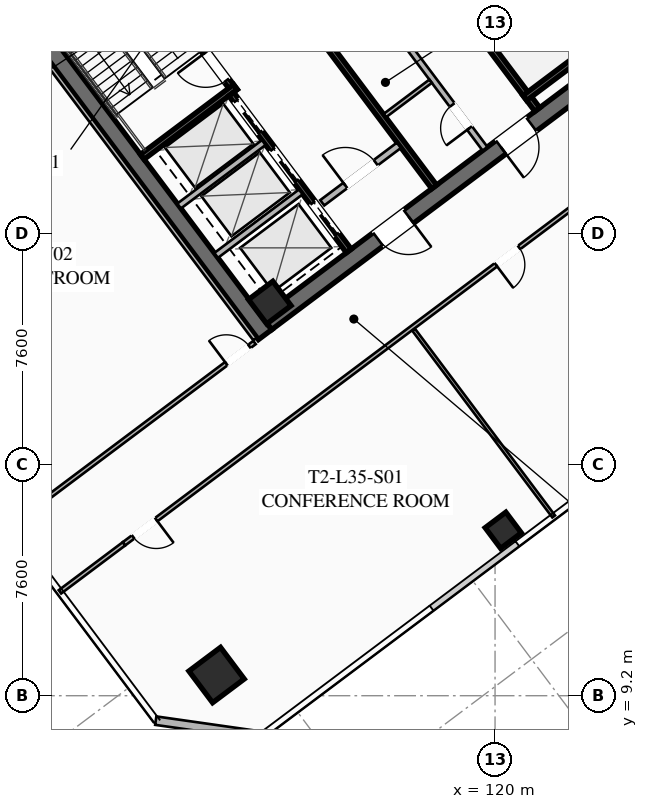
"""IFC4 building model, lengths in metres.
Left out: names, types, materials, properties, quantities, classifications, styles, units other than length and angle.
Written with IfcOpenShell. Run it as: python <this file> out.ifc"""

import sys

from ifc_helpers import new_model, si_unit, direction, frame, frame_2d, origin, origin_2d, place, context, subcontext, project, spatial, rectangle, hollow_rectangle, extrude, element, fill, save


model = new_model("IFC4")
c1 = context("Model", 3, precision=1e-05, world=origin(), true_north=direction((0.0, 1.0)))
c2 = subcontext(c1, "Body", "Model", "MODEL_VIEW")
j1 = project(units=[si_unit("LENGTHUNIT", "METRE"), si_unit("PLANEANGLEUNIT", "RADIAN")], contexts=[c1])
p1 = place(None, origin())
s1 = spatial("IfcSite", under=j1, at=p1, CompositionType="ELEMENT")
p2 = place(p1, origin())
s2 = spatial("IfcBuilding", under=s1, at=p2, CompositionType="ELEMENT")
p3 = place(p2, frame((0.0, 0.0, 132.15)))
s3 = spatial("IfcBuildingStorey", under=s2, at=p3, CompositionType="ELEMENT", Elevation=132.15)
for number, where, z_axis, x_axis in (
    (1, (112.436, 21.077, 0.0), (0.0, 0.0, 1.0), (-0.6, 0.8, 0.0)),
    (2, (115.564, 42.923, 0.0), (0.0, 0.0, 1.0), (0.6, -0.8, 0.0)),
):
    element("IfcWall", number, at=place(p3, frame(where, z_axis=z_axis, x_axis=x_axis)), inside=s3, PredefinedType="SHEAR", context=c2, shape_type="SweptSolid", body=[
        extrude(rectangle(XDim=15.6, YDim=0.55, at=frame_2d((7.8, 0.0))), origin(), (0.0, 0.0, 1.0), 3.55),
    ])
p4 = place(p3, frame((124.539, 30.498, 0.0), z_axis=(0.0, 0.0, 1.0), x_axis=(-0.799998054672, -0.600002593761, 0.0)))
e3 = element("IfcWall", 3, at=p4, inside=s3, PredefinedType="SHEAR", context=c2, shape_type="SweptSolid", body=[
    extrude(rectangle(XDim=15.06, YDim=0.55, at=frame_2d((7.53, 0.0))), origin(), (0.0, 0.0, 1.0), 3.55),
])
p5 = place(p4, frame((9.23, 0.0, 0.0)))
e4 = element("IfcOpeningElement", 4, at=p5, cuts=e3, PredefinedType="OPENING", context=c2, shape_type="SweptSolid", body=[
    extrude(rectangle(XDim=1.25, YDim=2.25, at=frame_2d((0.625, 1.125))), frame((0.0, 0.285, 0.0), z_axis=(0.0, -1.0, 0.0), x_axis=(1.0, 0.0, 0.0)), (0.0, 0.0, 1.0), 0.57),
])
p6 = place(p4, frame((4.18, 0.0, 0.0)))
e5 = element("IfcOpeningElement", 5, at=p6, cuts=e3, PredefinedType="OPENING", context=c2, shape_type="SweptSolid", body=[
    extrude(rectangle(XDim=1.25, YDim=2.25, at=frame_2d((0.625, 1.125))), frame((0.0, 0.285, 0.0), z_axis=(0.0, -1.0, 0.0), x_axis=(1.0, 0.0, 0.0)), (0.0, 0.0, 1.0), 0.57),
])
p7 = place(p3, frame((112.59, 22.13, 0.0), z_axis=(0.0, 0.0, 1.0), x_axis=(0.799999996291, 0.600000004945, 0.0)))
e6 = element("IfcColumn", 6, at=p7, inside=s3, PredefinedType="COLUMN", context=c2, shape_type="SweptSolid", body=[
    extrude(hollow_rectangle(XDim=1.0, YDim=1.0, WallThickness=0.04, at=origin_2d()), origin(), (0.0, 0.0, 1.0), 3.37),
])
p8 = place(p3, frame((110.84, 9.88, 0.0), z_axis=(0.0, 0.0, 1.0), x_axis=(0.799999996291, 0.600000004945, 0.0)))
e7 = element("IfcColumn", 7, at=p8, inside=s3, PredefinedType="COLUMN", context=c2, shape_type="SweptSolid", body=[
    extrude(hollow_rectangle(XDim=1.3, YDim=1.3, WallThickness=0.05, at=origin_2d()), origin(), (0.0, 0.0, 1.0), 3.37),
])
p9 = place(p3, frame((120.27, 14.64, 0.0), z_axis=(0.0, 0.0, 1.0), x_axis=(0.799999996291, 0.600000004945, 0.0)))
e8 = element("IfcColumn", 8, at=p9, inside=s3, PredefinedType="COLUMN", context=c2, shape_type="SweptSolid", body=[
    extrude(hollow_rectangle(XDim=0.85, YDim=0.85, WallThickness=0.035, at=origin_2d()), origin(), (0.0, 0.0, 1.0), 3.37),
])
p10 = place(p3, frame((112.34, 7.88, 0.0), z_axis=(0.0, 0.0, 1.0), x_axis=(-0.989949493661, 0.141421356237, 0.0)))
e9 = element("IfcWall", 9, at=p10, inside=s3, PredefinedType="SOLIDWALL", context=c2, shape_type="SweptSolid", body=[
    extrude(rectangle(XDim=3.536, YDim=0.28, at=frame_2d((1.768, 0.0))), origin(), (0.0, 0.0, 1.0), 3.37),
])
p11 = place(p3, frame((111.44, 29.08, 0.0), z_axis=(0.0, 0.0, 1.0), x_axis=(-0.59999029481, 0.8000072788, 0.0)))
e10 = element("IfcWall", 10, at=p11, inside=s3, PredefinedType="SHEAR", context=c2, shape_type="SweptSolid", body=[
    extrude(rectangle(XDim=8.05, YDim=0.2, at=frame_2d((4.025, 0.0))), origin(), (0.0, 0.0, 1.0), 3.37),
])
p12 = place(p11, frame((0.45, 0.0, 0.0)))
e11 = element("IfcOpeningElement", 11, at=p12, cuts=e10, PredefinedType="OPENING", context=c2, shape_type="SweptSolid", body=[
    extrude(rectangle(XDim=1.15, YDim=2.2, at=frame_2d((0.575, 1.1))), frame((0.0, 0.11, 0.0), z_axis=(0.0, -1.0, 0.0), x_axis=(1.0, 0.0, 0.0)), (0.0, 0.0, 1.0), 0.22),
])
p13 = place(p3, frame((108.396, 26.922, 0.0), z_axis=(0.0, 0.0, 1.0), x_axis=(0.800015298837, 0.599979601008, 0.0)))
e12 = element("IfcWall", 12, at=p13, inside=s3, PredefinedType="SHEAR", context=c2, shape_type="SweptSolid", body=[
    extrude(rectangle(XDim=3.83, YDim=0.2, at=frame_2d((1.915, 0.0))), origin(), (0.0, 0.0, 1.0), 3.37),
])
p14 = place(p3, frame((116.56, 34.92, 0.0), z_axis=(0.0, 0.0, 1.0), x_axis=(0.59999029481, -0.8000072788, 0.0)))
e13 = element("IfcWall", 13, at=p14, inside=s3, PredefinedType="SHEAR", context=c2, shape_type="SweptSolid", body=[
    extrude(rectangle(XDim=8.05, YDim=0.2, at=frame_2d((4.025, 0.0))), origin(), (0.0, 0.0, 1.0), 3.37),
])
p15 = place(p14, frame((0.45, 0.0, 0.0)))
e14 = element("IfcOpeningElement", 14, at=p15, cuts=e13, PredefinedType="OPENING", context=c2, shape_type="SweptSolid", body=[
    extrude(rectangle(XDim=1.15, YDim=2.2, at=frame_2d((0.575, 1.1))), frame((0.0, 0.11, 0.0), z_axis=(0.0, -1.0, 0.0), x_axis=(1.0, 0.0, 0.0)), (0.0, 0.0, 1.0), 0.22),
])
p16 = place(p3, frame((120.98, 28.86, 0.0), z_axis=(0.0, 0.0, 1.0), x_axis=(0.800015298837, 0.599979601008, 0.0)))
e15 = element("IfcWall", 15, at=p16, inside=s3, PredefinedType="SHEAR", context=c2, shape_type="SweptSolid", body=[
    extrude(rectangle(XDim=3.83, YDim=0.2, at=frame_2d((1.915, 0.0))), origin(), (0.0, 0.0, 1.0), 3.37),
])
p17 = place(p3, frame((117.998, 25.936, 0.0), z_axis=(0.0, 0.0, 1.0), x_axis=(-0.600002693989, 0.799997979501, 0.0)))
e16 = element("IfcWall", 16, at=p17, inside=s3, PredefinedType="SHEAR", context=c2, shape_type="SweptSolid", body=[
    extrude(rectangle(XDim=14.5, YDim=0.2, at=frame_2d((7.25, 0.0))), origin(), (0.0, 0.0, 1.0), 3.37),
])
p18 = place(p3, frame((114.316, 25.412, 0.0), z_axis=(0.0, 0.0, 1.0), x_axis=(0.800018601094, 0.59997519774, 0.0)))
e17 = element("IfcWall", 17, at=p18, inside=s3, PredefinedType="SOLIDWALL", context=c2, shape_type="SweptSolid", body=[
    extrude(rectangle(XDim=3.15, YDim=0.22, at=frame_2d((1.575, 0.0))), origin(), (0.0, 0.0, 1.0), 2.723),
])
p19 = place(p18, frame((0.95, 0.0, 0.0)))
e18 = element("IfcOpeningElement", 18, at=p19, cuts=e17, PredefinedType="OPENING", context=c2, shape_type="SweptSolid", body=[
    extrude(rectangle(XDim=1.25, YDim=2.25, at=frame_2d((0.625, 1.125))), frame((0.0, 0.12, 0.0), z_axis=(0.0, -1.0, 0.0), x_axis=(1.0, 0.0, 0.0)), (0.0, 0.0, 1.0), 0.24),
])
p20 = place(p3, frame((115.19, 23.83, 0.0), z_axis=(0.0, 0.0, 1.0), x_axis=(-0.599993943644, 0.800004542231, 0.0)))
e19 = element("IfcWall", 19, at=p20, inside=s3, PredefinedType="SHEAR", context=c2, shape_type="SweptSolid", body=[
    extrude(rectangle(XDim=6.45, YDim=0.2, at=frame_2d((3.225, 0.0))), origin(), (0.0, 0.0, 1.0), 3.37),
])
p21 = place(p20, frame((4.875, 0.0, 0.0)))
e20 = element("IfcOpeningElement", 20, at=p21, cuts=e19, PredefinedType="OPENING", context=c2, shape_type="SweptSolid", body=[
    extrude(rectangle(XDim=1.3, YDim=2.25, at=frame_2d((0.65, 1.125))), frame((0.0, 0.11, 0.0), z_axis=(0.0, -1.0, 0.0), x_axis=(1.0, 0.0, 0.0)), (0.0, 0.0, 1.0), 0.22),
])
p22 = place(p20, frame((2.875, 0.0, 0.0)))
e21 = element("IfcOpeningElement", 21, at=p22, cuts=e19, PredefinedType="OPENING", context=c2, shape_type="SweptSolid", body=[
    extrude(rectangle(XDim=1.3, YDim=2.25, at=frame_2d((0.65, 1.125))), frame((0.0, 0.11, 0.0), z_axis=(0.0, -1.0, 0.0), x_axis=(1.0, 0.0, 0.0)), (0.0, 0.0, 1.0), 0.22),
])
p23 = place(p20, frame((0.675, 0.0, 0.0)))
e22 = element("IfcOpeningElement", 22, at=p23, cuts=e19, PredefinedType="OPENING", context=c2, shape_type="SweptSolid", body=[
    extrude(rectangle(XDim=1.3, YDim=2.25, at=frame_2d((0.65, 1.125))), frame((0.0, 0.11, 0.0), z_axis=(0.0, -1.0, 0.0), x_axis=(1.0, 0.0, 0.0)), (0.0, 0.0, 1.0), 0.22),
])
for number, where, z_axis, x_axis in (
    (23, (110.826, 23.682, 0.0), (0.0, 0.0, 1.0), (0.8, 0.6, 0.0)),
    (24, (109.608, 25.306, 0.0), (0.0, 0.0, 1.0), (0.8, 0.6, 0.0)),
):
    element("IfcWall", number, at=place(p3, frame(where, z_axis=z_axis, x_axis=x_axis)), inside=s3, PredefinedType="SOLIDWALL", context=c2, shape_type="SweptSolid", body=[
        extrude(rectangle(XDim=3.48, YDim=0.2, at=frame_2d((1.74, 0.0))), origin(), (0.0, 0.0, 1.0), 3.37),
    ])
p24 = place(p3, frame((119.67, 27.19, 0.0), z_axis=(0.0, 0.0, 1.0), x_axis=(-0.599988677396, 0.800008491828, 0.0)))
e25 = element("IfcWall", 25, at=p24, inside=s3, PredefinedType="SOLIDWALL", context=c2, shape_type="SweptSolid", body=[
    extrude(rectangle(XDim=6.9, YDim=0.2, at=frame_2d((3.45, 0.0))), origin(), (0.0, 0.0, 1.0), 2.723),
])
p25 = place(p24, frame((0.85, 0.0, 0.0)))
e26 = element("IfcOpeningElement", 26, at=p25, cuts=e25, PredefinedType="OPENING", context=c2, shape_type="SweptSolid", body=[
    extrude(rectangle(XDim=0.95, YDim=2.05, at=frame_2d((0.475, 1.025))), frame((0.0, 0.11, 0.0), z_axis=(0.0, -1.0, 0.0), x_axis=(1.0, 0.0, 0.0)), (0.0, 0.0, 1.0), 0.22),
])
p26 = place(p24, frame((4.8, 0.0, 0.0)))
e27 = element("IfcOpeningElement", 27, at=p26, cuts=e25, PredefinedType="OPENING", context=c2, shape_type="SweptSolid", body=[
    extrude(rectangle(XDim=1.05, YDim=2.2, at=frame_2d((0.525, 1.1))), frame((0.0, 0.11, 0.0), z_axis=(0.0, -1.0, 0.0), x_axis=(1.0, 0.0, 0.0)), (0.0, 0.0, 1.0), 0.22),
])
p27 = place(p3, frame((116.376, 28.282, 0.0), z_axis=(0.0, 0.0, 1.0), x_axis=(0.8, 0.6, 0.0)))
e28 = element("IfcWall", 28, at=p27, inside=s3, PredefinedType="PARTITIONING", context=c2, shape_type="SweptSolid", body=[
    extrude(rectangle(XDim=1.88, YDim=0.135, at=frame_2d((0.94, 0.0))), origin(), (0.0, 0.0, 1.0), 2.723),
])
p28 = place(p3, frame((95.87, 30.09, 0.0), z_axis=(0.0, 0.0, 1.0), x_axis=(0.799997191971, 0.600003744021, 0.0)))
e29 = element("IfcWall", 29, at=p28, inside=s3, PredefinedType="PARTITIONING", context=c2, shape_type="SweptSolid", body=[
    extrude(rectangle(XDim=31.3, YDim=0.135, at=frame_2d((15.65, 0.0))), origin(), (0.0, 0.0, 1.0), 2.723),
])
p29 = place(p28, frame((0.3, 0.0, 0.0)))
e30 = element("IfcOpeningElement", 30, at=p29, cuts=e29, PredefinedType="OPENING", context=c2, shape_type="SweptSolid", body=[
    extrude(rectangle(XDim=0.95, YDim=2.05, at=frame_2d((0.475, 1.025))), frame((0.0, 0.077, 0.0), z_axis=(0.0, -1.0, 0.0), x_axis=(1.0, 0.0, 0.0)), (0.0, 0.0, 1.0), 0.155),
])
p30 = place(p28, frame((11.202, 0.0, 0.0)))
e31 = element("IfcOpeningElement", 31, at=p30, cuts=e29, PredefinedType="OPENING", context=c2, shape_type="SweptSolid", body=[
    extrude(rectangle(XDim=0.95, YDim=2.05, at=frame_2d((0.475, 1.025))), frame((0.0, 0.077, 0.0), z_axis=(0.0, -1.0, 0.0), x_axis=(1.0, 0.0, 0.0)), (0.0, 0.0, 1.0), 0.155),
])
p31 = place(p28, frame((15.474, 0.0, 0.0)))
e32 = element("IfcOpeningElement", 32, at=p31, cuts=e29, PredefinedType="OPENING", context=c2, shape_type="SweptSolid", body=[
    extrude(rectangle(XDim=0.95, YDim=2.05, at=frame_2d((0.475, 1.025))), frame((0.0, 0.077, 0.0), z_axis=(0.0, -1.0, 0.0), x_axis=(1.0, 0.0, 0.0)), (0.0, 0.0, 1.0), 0.155),
])
p32 = place(p28, frame((30.05, 0.0, 0.0)))
e33 = element("IfcOpeningElement", 33, at=p32, cuts=e29, PredefinedType="OPENING", context=c2, shape_type="SweptSolid", body=[
    extrude(rectangle(XDim=0.95, YDim=2.05, at=frame_2d((0.475, 1.025))), frame((0.0, 0.077, 0.0), z_axis=(0.0, -1.0, 0.0), x_axis=(1.0, 0.0, 0.0)), (0.0, 0.0, 1.0), 0.155),
])
p33 = place(p3, frame((132.832, 32.974, 0.0), z_axis=(0.0, 0.0, 1.0), x_axis=(-0.8, -0.6, 0.0)))
e34 = element("IfcWall", 34, at=p33, inside=s3, PredefinedType="PARTITIONING", context=c2, shape_type="SweptSolid", body=[
    extrude(rectangle(XDim=31.3, YDim=0.135, at=frame_2d((15.65, 0.0))), origin(), (0.0, 0.0, 1.0), 2.723),
])
p34 = place(p33, frame((29.97, 0.0, 0.0)))
e35 = element("IfcOpeningElement", 35, at=p34, cuts=e34, PredefinedType="OPENING", context=c2, shape_type="SweptSolid", body=[
    extrude(rectangle(XDim=0.95, YDim=2.05, at=frame_2d((0.475, 1.025))), frame((0.0, 0.077, 0.0), z_axis=(0.0, -1.0, 0.0), x_axis=(1.0, 0.0, 0.0)), (0.0, 0.0, 1.0), 0.155),
])
p35 = place(p33, frame((15.053, 0.0, 0.0)))
e36 = element("IfcOpeningElement", 36, at=p35, cuts=e34, PredefinedType="OPENING", context=c2, shape_type="SweptSolid", body=[
    extrude(rectangle(XDim=0.95, YDim=2.05, at=frame_2d((0.475, 1.025))), frame((0.0, 0.077, 0.0), z_axis=(0.0, -1.0, 0.0), x_axis=(1.0, 0.0, 0.0)), (0.0, 0.0, 1.0), 0.155),
])
p36 = place(p33, frame((0.38, 0.0, 0.0)))
e37 = element("IfcOpeningElement", 37, at=p36, cuts=e34, PredefinedType="OPENING", context=c2, shape_type="SweptSolid", body=[
    extrude(rectangle(XDim=0.95, YDim=2.05, at=frame_2d((0.475, 1.025))), frame((0.0, 0.077, 0.0), z_axis=(0.0, -1.0, 0.0), x_axis=(1.0, 0.0, 0.0)), (0.0, 0.0, 1.0), 0.155),
])
p37 = place(p3, frame((105.688, 12.616, 0.0), z_axis=(0.0, 0.0, 1.0), x_axis=(0.799977721118, 0.600029704027, 0.0)))
e38 = element("IfcWall", 38, at=p37, inside=s3, PredefinedType="PARTITIONING", context=c2, shape_type="SweptSolid", body=[
    extrude(rectangle(XDim=2.63, YDim=0.135, at=frame_2d((1.315, 0.0))), origin(), (0.0, 0.0, 1.0), 2.723),
])
p38 = place(p3, frame((121.928, 15.096, 0.0), z_axis=(0.0, 0.0, 1.0), x_axis=(-0.5999898274, 0.800007629349, 0.0)))
e39 = element("IfcWall", 39, at=p38, inside=s3, PredefinedType="PARTITIONING", context=c2, shape_type="SweptSolid", body=[
    extrude(rectangle(XDim=7.68, YDim=0.11, at=frame_2d((3.84, 0.0))), origin(), (0.0, 0.0, 1.0), 2.723),
])
p39 = place(p3, frame((112.104, 20.928, 0.0), z_axis=(0.0, 0.0, 1.0), x_axis=(-0.599994940075, 0.800003794918, 0.0)))
e40 = element("IfcWall", 40, at=p39, inside=s3, PredefinedType="PARTITIONING", context=c2, shape_type="SweptSolid", body=[
    extrude(rectangle(XDim=15.44, YDim=0.135, at=frame_2d((7.72, 0.0))), origin(), (0.0, 0.0, 1.0), 2.723),
])
p40 = place(p3, frame((104.056, 14.792, 0.0), z_axis=(0.0, 0.0, 1.0), x_axis=(0.800002918023, 0.599996109283, 0.0)))
e41 = element("IfcWall", 41, at=p40, inside=s3, PredefinedType="PARTITIONING", context=c2, shape_type="SweptSolid", body=[
    extrude(rectangle(XDim=10.04, YDim=0.135, at=frame_2d((5.02, 0.0))), origin(), (0.0, 0.0, 1.0), 2.723),
])
p41 = place(p40, frame((8.88, 0.0, 0.0)))
e42 = element("IfcOpeningElement", 42, at=p41, cuts=e41, PredefinedType="OPENING", context=c2, shape_type="SweptSolid", body=[
    extrude(rectangle(XDim=0.95, YDim=2.05, at=frame_2d((0.475, 1.025))), frame((0.0, 0.077, 0.0), z_axis=(0.0, -1.0, 0.0), x_axis=(1.0, 0.0, 0.0)), (0.0, 0.0, 1.0), 0.155),
])
p42 = place(p5, origin())
e43 = element("IfcDoor", 43, at=p42, inside=s3, OperationType="SINGLE_SWING_LEFT", PredefinedType="DOOR", context=c2, shape_type="SweptSolid", body=[
    extrude(rectangle(XDim=1.25, YDim=2.25, at=frame_2d((0.625, 1.125))), frame((0.0, 0.025, 0.0), z_axis=(0.0, -1.0, 0.0), x_axis=(1.0, 0.0, 0.0)), (0.0, 0.0, 1.0), 0.05),
])
fill(e4, e43)
p43 = place(p6, origin())
e44 = element("IfcDoor", 44, at=p43, inside=s3, OperationType="SINGLE_SWING_RIGHT", PredefinedType="DOOR", context=c2, shape_type="SweptSolid", body=[
    extrude(rectangle(XDim=1.25, YDim=2.25, at=frame_2d((0.625, 1.125))), frame((0.0, 0.025, 0.0), z_axis=(0.0, -1.0, 0.0), x_axis=(1.0, 0.0, 0.0)), (0.0, 0.0, 1.0), 0.05),
])
fill(e5, e44)
p44 = place(p12, origin())
e45 = element("IfcDoor", 45, at=p44, inside=s3, OperationType="SINGLE_SWING_RIGHT", PredefinedType="DOOR", context=c2, shape_type="SweptSolid", body=[
    extrude(rectangle(XDim=1.15, YDim=2.2, at=frame_2d((0.575, 1.1))), frame((0.0, 0.025, 0.0), z_axis=(0.0, -1.0, 0.0), x_axis=(1.0, 0.0, 0.0)), (0.0, 0.0, 1.0), 0.05),
])
fill(e11, e45)
p45 = place(p19, origin())
e46 = element("IfcDoor", 46, at=p45, inside=s3, OperationType="SINGLE_SWING_LEFT", PredefinedType="DOOR", context=c2, shape_type="SweptSolid", body=[
    extrude(rectangle(XDim=1.25, YDim=2.25, at=frame_2d((0.625, 1.125))), frame((0.0, 0.025, 0.0), z_axis=(0.0, -1.0, 0.0), x_axis=(1.0, 0.0, 0.0)), (0.0, 0.0, 1.0), 0.05),
])
fill(e18, e46)
p46 = place(p25, origin())
e47 = element("IfcDoor", 47, at=p46, inside=s3, OperationType="SINGLE_SWING_LEFT", PredefinedType="DOOR", context=c2, shape_type="SweptSolid", body=[
    extrude(rectangle(XDim=0.95, YDim=2.05, at=frame_2d((0.475, 1.025))), frame((0.0, 0.025, 0.0), z_axis=(0.0, -1.0, 0.0), x_axis=(1.0, 0.0, 0.0)), (0.0, 0.0, 1.0), 0.05),
])
fill(e26, e47)
p47 = place(p34, origin())
e48 = element("IfcDoor", 48, at=p47, inside=s3, OperationType="SINGLE_SWING_LEFT", PredefinedType="DOOR", context=c2, shape_type="SweptSolid", body=[
    extrude(rectangle(XDim=0.95, YDim=2.05, at=frame_2d((0.475, 1.025))), frame((0.0, 0.025, 0.0), z_axis=(0.0, -1.0, 0.0), x_axis=(1.0, 0.0, 0.0)), (0.0, 0.0, 1.0), 0.05),
])
fill(e35, e48)
p48 = place(p35, origin())
e49 = element("IfcDoor", 49, at=p48, inside=s3, OperationType="SINGLE_SWING_RIGHT", PredefinedType="DOOR", context=c2, shape_type="SweptSolid", body=[
    extrude(rectangle(XDim=0.95, YDim=2.05, at=frame_2d((0.475, 1.025))), frame((0.0, 0.025, 0.0), z_axis=(0.0, -1.0, 0.0), x_axis=(1.0, 0.0, 0.0)), (0.0, 0.0, 1.0), 0.05),
])
fill(e36, e49)
p49 = place(p41, origin())
e50 = element("IfcDoor", 50, at=p49, inside=s3, OperationType="SINGLE_SWING_LEFT", PredefinedType="DOOR", context=c2, shape_type="SweptSolid", body=[
    extrude(rectangle(XDim=0.95, YDim=2.05, at=frame_2d((0.475, 1.025))), frame((0.0, 0.025, 0.0), z_axis=(0.0, -1.0, 0.0), x_axis=(1.0, 0.0, 0.0)), (0.0, 0.0, 1.0), 0.05),
])
fill(e42, e50)
p50 = place(p21, origin())
e51 = element("IfcDoor", 51, at=p50, inside=s3, OperationType="SLIDING_TO_LEFT", PredefinedType="DOOR", context=c2, shape_type="SweptSolid", body=[
    extrude(rectangle(XDim=1.3, YDim=2.25, at=frame_2d((0.65, 1.125))), frame((0.0, 0.025, 0.0), z_axis=(0.0, -1.0, 0.0), x_axis=(1.0, 0.0, 0.0)), (0.0, 0.0, 1.0), 0.05),
])
fill(e20, e51)
p51 = place(p22, origin())
e52 = element("IfcDoor", 52, at=p51, inside=s3, OperationType="SLIDING_TO_LEFT", PredefinedType="DOOR", context=c2, shape_type="SweptSolid", body=[
    extrude(rectangle(XDim=1.3, YDim=2.25, at=frame_2d((0.65, 1.125))), frame((0.0, 0.025, 0.0), z_axis=(0.0, -1.0, 0.0), x_axis=(1.0, 0.0, 0.0)), (0.0, 0.0, 1.0), 0.05),
])
fill(e21, e52)
p52 = place(p23, origin())
e53 = element("IfcDoor", 53, at=p52, inside=s3, OperationType="SLIDING_TO_LEFT", PredefinedType="DOOR", context=c2, shape_type="SweptSolid", body=[
    extrude(rectangle(XDim=1.3, YDim=2.25, at=frame_2d((0.65, 1.125))), frame((0.0, 0.025, 0.0), z_axis=(0.0, -1.0, 0.0), x_axis=(1.0, 0.0, 0.0)), (0.0, 0.0, 1.0), 0.05),
])
fill(e22, e53)
save(model, sys.argv[1])
